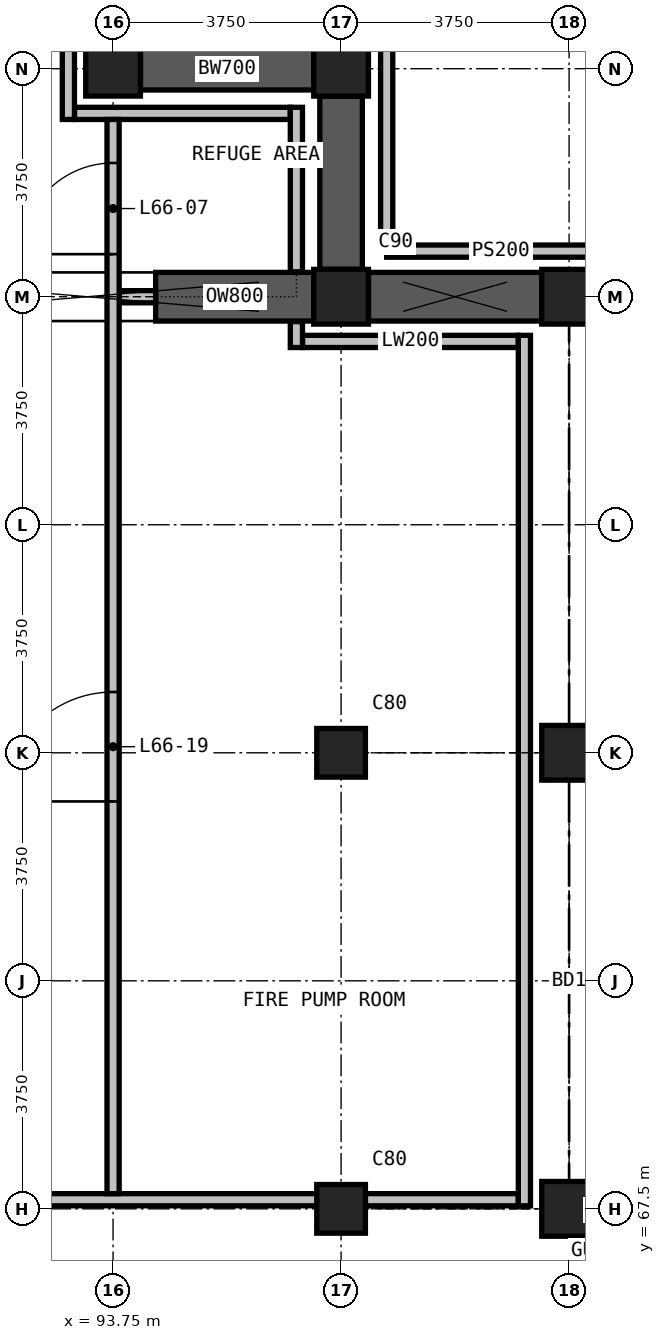
"""IFC4 building model, lengths in metres.
Left out: names, types, materials, properties, quantities, classifications, styles, units other than length and angle.
Written with IfcOpenShell. Run it as: python <this file> out.ifc"""

import sys

from ifc_helpers import new_model, si_unit, direction, frame, frame_2d, origin, origin_2d, place, context, subcontext, project, spatial, rectangle, extrude, element, fill, save


model = new_model("IFC4")
c1 = context("Model", 3, precision=1e-05, world=origin(), true_north=direction((0.0, 1.0)))
c2 = subcontext(c1, "Body", "Model", "MODEL_VIEW")
j1 = project(units=[si_unit("LENGTHUNIT", "METRE"), si_unit("PLANEANGLEUNIT", "RADIAN")], contexts=[c1])
p1 = place(None, origin())
s1 = spatial("IfcSite", under=j1, at=p1, CompositionType="ELEMENT")
p2 = place(p1, origin())
s2 = spatial("IfcBuilding", under=s1, at=p2, CompositionType="ELEMENT")
p3 = place(p2, frame((0.0, 0.0, 253.5)))
s3 = spatial("IfcBuildingStorey", under=s2, at=p3, CompositionType="ELEMENT", Elevation=253.5)
p4 = place(p3, frame((93.75, 86.25, 0.0), z_axis=(0.0, 0.0, 1.0), x_axis=(1.0, 0.0, 0.0)))
e1 = element("IfcColumn", 1, at=p4, inside=s3, PredefinedType="COLUMN", context=c2, shape_type="SweptSolid", body=[
    extrude(rectangle(XDim=0.9, YDim=0.9, at=origin_2d()), origin(), (0.0, 0.0, 1.0), 5.0),
])
for number, where, z_axis, x_axis in (
    (2, (97.5, 67.5, 0.0), (0.0, 0.0, 1.0), (1.0, 0.0, 0.0)),
    (3, (97.5, 75.0, 0.0), (0.0, 0.0, 1.0), (1.0, 0.0, 0.0)),
):
    element("IfcColumn", number, at=place(p3, frame(where, z_axis=z_axis, x_axis=x_axis)), inside=s3, PredefinedType="COLUMN", context=c2, shape_type="SweptSolid", body=[
        extrude(rectangle(XDim=0.8, YDim=0.8, at=origin_2d()), origin(), (0.0, 0.0, 1.0), 5.0),
    ])
for number, where, z_axis, x_axis in (
    (4, (97.5, 82.5, 0.0), (0.0, 0.0, 1.0), (1.0, 0.0, 0.0)),
    (5, (97.5, 86.25, 0.0), (0.0, 0.0, 1.0), (1.0, 0.0, 0.0)),
    (6, (101.25, 67.5, 0.0), (0.0, 0.0, 1.0), (1.0, 0.0, 0.0)),
    (7, (101.25, 75.0, 0.0), (0.0, 0.0, 1.0), (1.0, 0.0, 0.0)),
    (8, (101.25, 82.5, 0.0), (0.0, 0.0, 1.0), (1.0, 0.0, 0.0)),
):
    element("IfcColumn", number, at=place(p3, frame(where, z_axis=z_axis, x_axis=x_axis)), inside=s3, PredefinedType="COLUMN", context=c2, shape_type="SweptSolid", body=[
        extrude(rectangle(XDim=0.9, YDim=0.9, at=origin_2d()), origin(), (0.0, 0.0, 1.0), 5.0),
    ])
for number, where, z_axis, x_axis in (
    (9, (94.2, 86.25, 0.0), (0.0, 0.0, 1.0), (1.0, 0.0, 0.0)),
    (10, (97.5, 85.8, 0.0), (0.0, 0.0, 1.0), (0.0, -1.0, 0.0)),
):
    element("IfcWall", number, at=place(p3, frame(where, z_axis=z_axis, x_axis=x_axis)), inside=s3, PredefinedType="SHEAR", context=c2, shape_type="SweptSolid", body=[
        extrude(rectangle(XDim=2.85, YDim=0.7, at=frame_2d((1.425, 0.0))), origin(), (0.0, 0.0, 1.0), 4.7),
    ])
p5 = place(p3, frame((94.45, 82.5, 0.0), z_axis=(0.0, 0.0, 1.0), x_axis=(1.0, 0.0, 0.0)))
e11 = element("IfcWall", 11, at=p5, inside=s3, PredefinedType="SHEAR", context=c2, shape_type="SweptSolid", body=[
    extrude(rectangle(XDim=2.6, YDim=0.8, at=frame_2d((1.3, 0.0))), origin(), (0.0, 0.0, 1.0), 4.7),
])
p6 = place(p3, frame((97.95, 82.5, 0.0), z_axis=(0.0, 0.0, 1.0), x_axis=(1.0, 0.0, 0.0)))
e12 = element("IfcWall", 12, at=p6, inside=s3, PredefinedType="SHEAR", context=c2, shape_type="SweptSolid", body=[
    extrude(rectangle(XDim=2.85, YDim=0.8, at=frame_2d((1.425, 0.0))), origin(), (0.0, 0.0, 1.0), 4.7),
])
for number, where, z_axis, x_axis in (
    (13, (98.25, 83.25, 0.0), (0.0, 0.0, 1.0), (1.0, 0.0, 0.0)),
    (14, (98.25, 83.25, 0.0), (0.0, 0.0, 1.0), (0.0, 1.0, 0.0)),
):
    element("IfcWall", number, at=place(p3, frame(where, z_axis=z_axis, x_axis=x_axis)), inside=s3, PredefinedType="SOLIDWALL", context=c2, shape_type="SweptSolid", body=[
        extrude(rectangle(XDim=3.75, YDim=0.2, at=frame_2d((1.875, 0.0))), origin(), (0.0, 0.0, 1.0), 4.7),
    ])
p7 = place(p3, frame((69.35, 67.65, 0.0), z_axis=(0.0, 0.0, 1.0), x_axis=(1.0, 0.0, 0.0)))
e15 = element("IfcWall", 15, at=p7, inside=s3, PredefinedType="PARTITIONING", context=c2, shape_type="SweptSolid", body=[
    extrude(rectangle(XDim=28.55, YDim=0.2, at=frame_2d((14.275, 0.0))), origin(), (0.0, 0.0, 1.0), 4.7),
])
p8 = place(p3, frame((97.9, 67.65, 0.0), z_axis=(0.0, 0.0, 1.0), x_axis=(1.0, 0.0, 0.0)))
e16 = element("IfcWall", 16, at=p8, inside=s3, PredefinedType="PARTITIONING", context=c2, shape_type="SweptSolid", body=[
    extrude(rectangle(XDim=2.515, YDim=0.2, at=frame_2d((1.258, 0.0))), origin(), (0.0, 0.0, 1.0), 3.9),
])
p9 = place(p3, frame((96.865, 81.765, 0.0), z_axis=(0.0, 0.0, 1.0), x_axis=(1.0, 0.0, 0.0)))
e17 = element("IfcWall", 17, at=p9, inside=s3, PredefinedType="PARTITIONING", context=c2, shape_type="SweptSolid", body=[
    extrude(rectangle(XDim=3.55, YDim=0.2, at=frame_2d((1.775, 0.0))), origin(), (0.0, 0.0, 1.0), 4.7),
])
p10 = place(p3, frame((93.85, 82.5, 0.0), z_axis=(0.0, 0.0, 1.0), x_axis=(1.0, 0.0, 0.0)))
e18 = element("IfcWall", 18, at=p10, inside=s3, PredefinedType="PARTITIONING", context=c2, shape_type="SweptSolid", body=[
    extrude(rectangle(XDim=0.6, YDim=0.2, at=frame_2d((0.3, 0.0))), origin(), (0.0, 0.0, 1.0), 2.4),
])
p11 = place(p3, frame((93.115, 85.515, 0.0), z_axis=(0.0, 0.0, 1.0), x_axis=(1.0, 0.0, 0.0)))
e19 = element("IfcWall", 19, at=p11, inside=s3, PredefinedType="PARTITIONING", context=c2, shape_type="SweptSolid", body=[
    extrude(rectangle(XDim=3.55, YDim=0.2, at=frame_2d((1.775, 0.0))), origin(), (0.0, 0.0, 1.0), 4.7),
])
p12 = place(p3, frame((93.015, 85.415, 0.0), z_axis=(0.0, 0.0, 1.0), x_axis=(0.0, 1.0, 0.0)))
e20 = element("IfcWall", 20, at=p12, inside=s3, PredefinedType="PARTITIONING", context=c2, shape_type="SweptSolid", body=[
    extrude(rectangle(XDim=3.95, YDim=0.2, at=frame_2d((1.975, 0.0))), origin(), (0.0, 0.0, 1.0), 4.7),
])
p13 = place(p3, frame((93.75, 67.75, 0.0), z_axis=(0.0, 0.0, 1.0), x_axis=(0.0, 1.0, 0.0)))
e21 = element("IfcWall", 21, at=p13, inside=s3, PredefinedType="PARTITIONING", context=c2, shape_type="SweptSolid", body=[
    extrude(rectangle(XDim=17.665, YDim=0.2, at=frame_2d((8.833, 0.0))), origin(), (0.0, 0.0, 1.0), 4.7),
])
p14 = place(p13, frame((15.45, 0.0, 0.0)))
e22 = element("IfcOpeningElement", 22, at=p14, cuts=e21, PredefinedType="OPENING", context=c2, shape_type="SweptSolid", body=[
    extrude(rectangle(XDim=1.5, YDim=2.2, at=frame_2d((0.75, 1.1))), frame((0.0, 0.11, 0.0), z_axis=(0.0, -1.0, 0.0), x_axis=(1.0, 0.0, 0.0)), (0.0, 0.0, 1.0), 0.22),
])
p15 = place(p13, frame((6.45, 0.0, 0.0)))
e23 = element("IfcOpeningElement", 23, at=p15, cuts=e21, PredefinedType="OPENING", context=c2, shape_type="SweptSolid", body=[
    extrude(rectangle(XDim=1.8, YDim=2.4, at=frame_2d((0.9, 1.2))), frame((0.0, 0.11, 0.0), z_axis=(0.0, -1.0, 0.0), x_axis=(1.0, 0.0, 0.0)), (0.0, 0.0, 1.0), 0.22),
])
p16 = place(p3, frame((96.765, 81.665, 0.0), z_axis=(0.0, 0.0, 1.0), x_axis=(0.0, 1.0, 0.0)))
e24 = element("IfcWall", 24, at=p16, inside=s3, PredefinedType="PARTITIONING", context=c2, shape_type="SweptSolid", body=[
    extrude(rectangle(XDim=0.425, YDim=0.2, at=frame_2d((0.212, 0.0))), origin(), (0.0, 0.0, 1.0), 4.7),
])
p17 = place(p3, frame((96.765, 82.91, 0.0), z_axis=(0.0, 0.0, 1.0), x_axis=(0.0, 1.0, 0.0)))
e25 = element("IfcWall", 25, at=p17, inside=s3, PredefinedType="PARTITIONING", context=c2, shape_type="SweptSolid", body=[
    extrude(rectangle(XDim=2.705, YDim=0.2, at=frame_2d((1.353, 0.0))), origin(), (0.0, 0.0, 1.0), 4.7),
])
p18 = place(p3, frame((100.515, 67.55, 0.0), z_axis=(0.0, 0.0, 1.0), x_axis=(0.0, 1.0, 0.0)))
e26 = element("IfcWall", 26, at=p18, inside=s3, PredefinedType="PARTITIONING", context=c2, shape_type="SweptSolid", body=[
    extrude(rectangle(XDim=14.315, YDim=0.2, at=frame_2d((7.157, 0.0))), origin(), (0.0, 0.0, 1.0), 4.7),
])
p19 = place(p14, origin())
e27 = element("IfcDoor", 27, at=p19, inside=s3, OperationType="DOUBLE_DOOR_SINGLE_SWING", PredefinedType="DOOR", context=c2, shape_type="SweptSolid", body=[
    extrude(rectangle(XDim=1.5, YDim=2.2, at=frame_2d((0.75, 1.1))), frame((0.0, 0.025, 0.0), z_axis=(0.0, -1.0, 0.0), x_axis=(1.0, 0.0, 0.0)), (0.0, 0.0, 1.0), 0.05),
])
fill(e22, e27)
p20 = place(p15, origin())
e28 = element("IfcDoor", 28, at=p20, inside=s3, OperationType="DOUBLE_DOOR_SINGLE_SWING", PredefinedType="DOOR", context=c2, shape_type="SweptSolid", body=[
    extrude(rectangle(XDim=1.8, YDim=2.4, at=frame_2d((0.9, 1.2))), frame((0.0, 0.025, 0.0), z_axis=(0.0, -1.0, 0.0), x_axis=(1.0, 0.0, 0.0)), (0.0, 0.0, 1.0), 0.05),
])
fill(e23, e28)
save(model, sys.argv[1])
